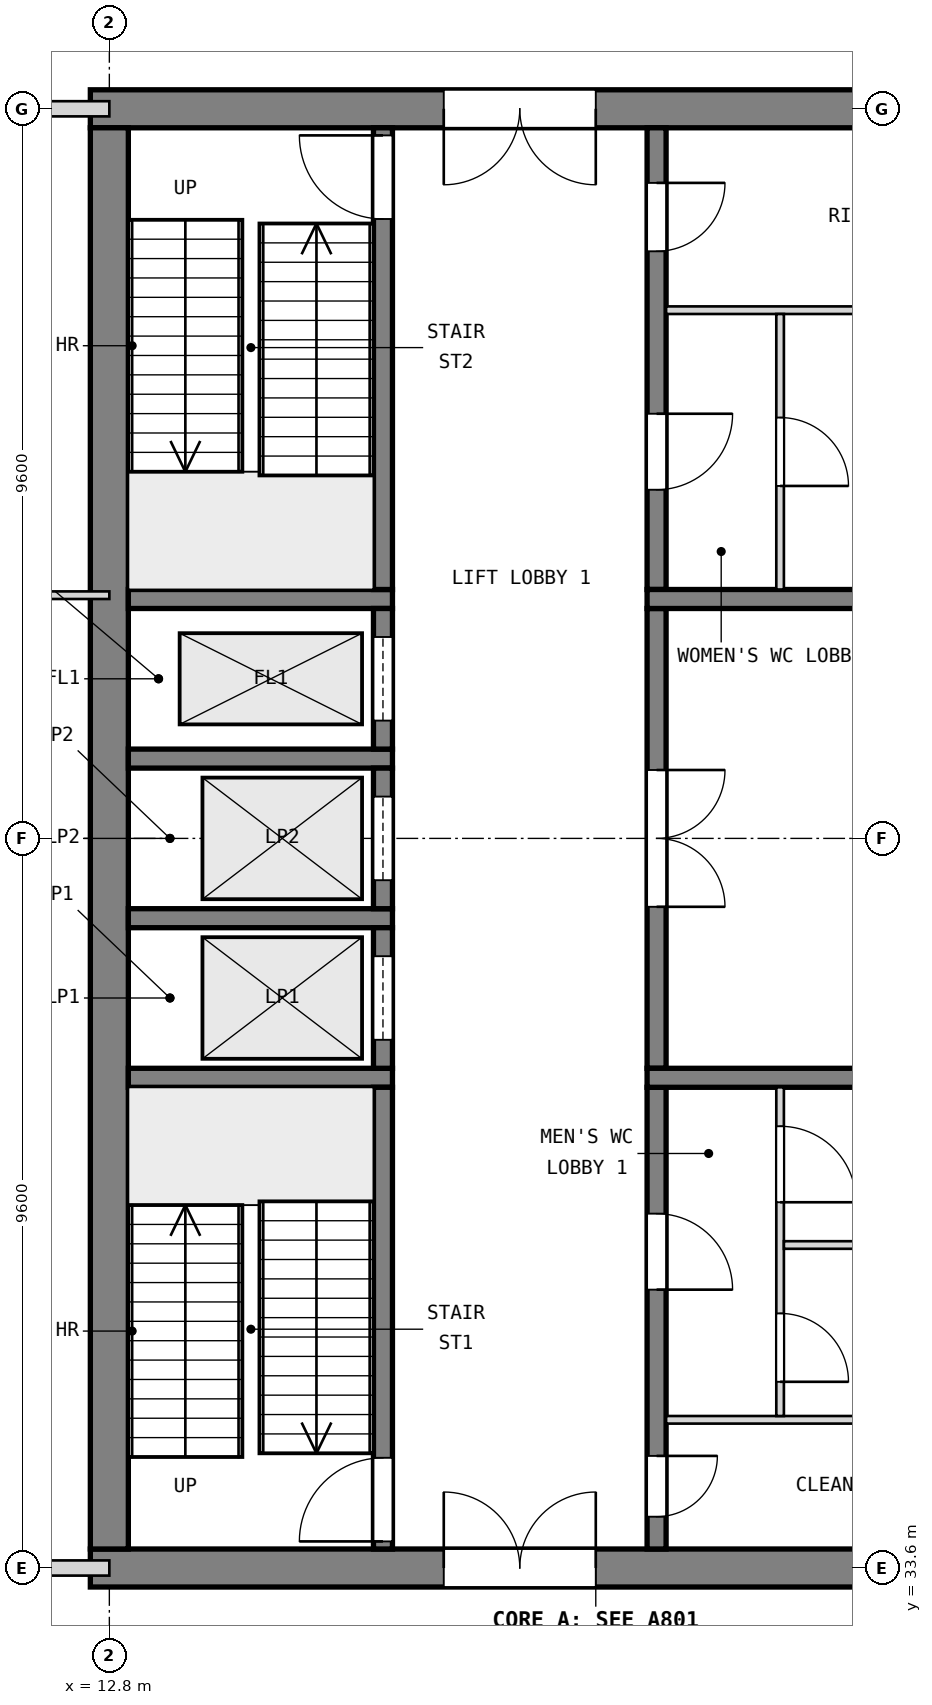
"""IFC4 building model, lengths in metres.
Left out: names, types, materials, properties, quantities, classifications, styles, units other than length and angle.
Written with IfcOpenShell. Run it as: python <this file> out.ifc"""

import sys

from ifc_helpers import new_model, si_unit, direction, frame, frame_2d, origin, place, context, subcontext, project, spatial, rectangle, extrude, element, fill, save


model = new_model("IFC4")
c1 = context("Model", 3, precision=1e-05, world=origin(), true_north=direction((0.0, 1.0)))
c2 = subcontext(c1, "Body", "Model", "MODEL_VIEW")
j1 = project(units=[si_unit("LENGTHUNIT", "METRE"), si_unit("PLANEANGLEUNIT", "RADIAN")], contexts=[c1])
p1 = place(None, origin())
s1 = spatial("IfcSite", under=j1, at=p1, CompositionType="ELEMENT")
p2 = place(p1, origin())
s2 = spatial("IfcBuilding", under=s1, at=p2, CompositionType="ELEMENT")
p3 = place(p2, frame((0.0, 0.0, -4.8)))
s3 = spatial("IfcBuildingStorey", under=s2, at=p3, CompositionType="ELEMENT", Elevation=-4.8)
p4 = place(p3, frame((12.55, 52.8, 0.0), z_axis=(0.0, 0.0, 1.0), x_axis=(1.0, 0.0, 0.0)))
e1 = element("IfcWall", 1, at=p4, inside=s3, PredefinedType="SHEAR", context=c2, shape_type="SweptSolid", body=[
    extrude(rectangle(XDim=13.3, YDim=0.5, at=frame_2d((6.65, 0.0))), origin(), (0.0, 0.0, 1.0), 4.8),
])
p5 = place(p4, frame((4.65, 0.0, 0.0)))
e2 = element("IfcOpeningElement", 2, at=p5, cuts=e1, PredefinedType="OPENING", context=c2, shape_type="SweptSolid", body=[
    extrude(rectangle(XDim=2.0, YDim=2.1, at=frame_2d((1.0, 1.05))), frame((0.0, 0.26, 0.0), z_axis=(0.0, -1.0, 0.0), x_axis=(1.0, 0.0, 0.0)), (0.0, 0.0, 1.0), 0.52),
])
p6 = place(p3, frame((12.55, 33.6, 0.0), z_axis=(0.0, 0.0, 1.0), x_axis=(1.0, 0.0, 0.0)))
e3 = element("IfcWall", 3, at=p6, inside=s3, PredefinedType="SHEAR", context=c2, shape_type="SweptSolid", body=[
    extrude(rectangle(XDim=13.3, YDim=0.5, at=frame_2d((6.65, 0.0))), origin(), (0.0, 0.0, 1.0), 4.8),
])
p7 = place(p6, frame((4.65, 0.0, 0.0)))
e4 = element("IfcOpeningElement", 4, at=p7, cuts=e3, PredefinedType="OPENING", context=c2, shape_type="SweptSolid", body=[
    extrude(rectangle(XDim=2.0, YDim=2.1, at=frame_2d((1.0, 1.05))), frame((0.0, 0.26, 0.0), z_axis=(0.0, -1.0, 0.0), x_axis=(1.0, 0.0, 0.0)), (0.0, 0.0, 1.0), 0.52),
])
p8 = place(p3, frame((12.8, 33.85, 0.0), z_axis=(0.0, 0.0, 1.0), x_axis=(0.0, 1.0, 0.0)))
e5 = element("IfcWall", 5, at=p8, inside=s3, PredefinedType="SHEAR", context=c2, shape_type="SweptSolid", body=[
    extrude(rectangle(XDim=18.7, YDim=0.5, at=frame_2d((9.35, 0.0))), origin(), (0.0, 0.0, 1.0), 4.8),
])
for number, where, z_axis, x_axis in (
    (6, (13.05, 40.05, 0.0), (0.0, 0.0, 1.0), (1.0, 0.0, 0.0)),
    (7, (13.05, 42.15, 0.0), (0.0, 0.0, 1.0), (1.0, 0.0, 0.0)),
    (8, (13.05, 44.25, 0.0), (0.0, 0.0, 1.0), (1.0, 0.0, 0.0)),
    (9, (13.05, 46.35, 0.0), (0.0, 0.0, 1.0), (1.0, 0.0, 0.0)),
):
    element("IfcWall", number, at=place(p3, frame(where, z_axis=z_axis, x_axis=x_axis)), inside=s3, PredefinedType="SOLIDWALL", context=c2, shape_type="SweptSolid", body=[
        extrude(rectangle(XDim=3.475, YDim=0.25, at=frame_2d((1.737, 0.0))), origin(), (0.0, 0.0, 1.0), 4.5),
    ])
p9 = place(p3, frame((16.4, 33.85, 0.0), z_axis=(0.0, 0.0, 1.0), x_axis=(0.0, 1.0, 0.0)))
e10 = element("IfcWall", 10, at=p9, inside=s3, PredefinedType="SOLIDWALL", context=c2, shape_type="SweptSolid", body=[
    extrude(rectangle(XDim=6.075, YDim=0.25, at=frame_2d((3.038, 0.0))), origin(), (0.0, 0.0, 1.0), 4.5),
])
p10 = place(p9, frame((0.1, 0.0, 0.0)))
e11 = element("IfcOpeningElement", 11, at=p10, cuts=e10, PredefinedType="OPENING", context=c2, shape_type="SweptSolid", body=[
    extrude(rectangle(XDim=1.1, YDim=2.1, at=frame_2d((0.55, 1.05))), frame((0.0, 0.135, 0.0), z_axis=(0.0, -1.0, 0.0), x_axis=(1.0, 0.0, 0.0)), (0.0, 0.0, 1.0), 0.27),
])
p11 = place(p3, frame((16.4, 40.175, 0.0), z_axis=(0.0, 0.0, 1.0), x_axis=(0.0, 1.0, 0.0)))
e12 = element("IfcWall", 12, at=p11, inside=s3, PredefinedType="SOLIDWALL", context=c2, shape_type="SweptSolid", body=[
    extrude(rectangle(XDim=1.85, YDim=0.25, at=frame_2d((0.925, 0.0))), origin(), (0.0, 0.0, 1.0), 4.5),
])
p12 = place(p11, frame((0.375, 0.0, 0.0)))
e13 = element("IfcOpeningElement", 13, at=p12, cuts=e12, PredefinedType="OPENING", context=c2, shape_type="SweptSolid", body=[
    extrude(rectangle(XDim=1.1, YDim=2.1, at=frame_2d((0.55, 1.05))), frame((0.0, 0.135, 0.0), z_axis=(0.0, -1.0, 0.0), x_axis=(1.0, 0.0, 0.0)), (0.0, 0.0, 1.0), 0.27),
])
p13 = place(p3, frame((16.4, 42.275, 0.0), z_axis=(0.0, 0.0, 1.0), x_axis=(0.0, 1.0, 0.0)))
e14 = element("IfcWall", 14, at=p13, inside=s3, PredefinedType="SOLIDWALL", context=c2, shape_type="SweptSolid", body=[
    extrude(rectangle(XDim=1.85, YDim=0.25, at=frame_2d((0.925, 0.0))), origin(), (0.0, 0.0, 1.0), 4.5),
])
p14 = place(p13, frame((0.375, 0.0, 0.0)))
e15 = element("IfcOpeningElement", 15, at=p14, cuts=e14, PredefinedType="OPENING", context=c2, shape_type="SweptSolid", body=[
    extrude(rectangle(XDim=1.1, YDim=2.1, at=frame_2d((0.55, 1.05))), frame((0.0, 0.135, 0.0), z_axis=(0.0, -1.0, 0.0), x_axis=(1.0, 0.0, 0.0)), (0.0, 0.0, 1.0), 0.27),
])
p15 = place(p3, frame((16.4, 44.375, 0.0), z_axis=(0.0, 0.0, 1.0), x_axis=(0.0, 1.0, 0.0)))
e16 = element("IfcWall", 16, at=p15, inside=s3, PredefinedType="SOLIDWALL", context=c2, shape_type="SweptSolid", body=[
    extrude(rectangle(XDim=1.85, YDim=0.25, at=frame_2d((0.925, 0.0))), origin(), (0.0, 0.0, 1.0), 4.5),
])
p16 = place(p15, frame((0.375, 0.0, 0.0)))
e17 = element("IfcOpeningElement", 17, at=p16, cuts=e16, PredefinedType="OPENING", context=c2, shape_type="SweptSolid", body=[
    extrude(rectangle(XDim=1.1, YDim=2.1, at=frame_2d((0.55, 1.05))), frame((0.0, 0.135, 0.0), z_axis=(0.0, -1.0, 0.0), x_axis=(1.0, 0.0, 0.0)), (0.0, 0.0, 1.0), 0.27),
])
p17 = place(p3, frame((16.4, 46.475, 0.0), z_axis=(0.0, 0.0, 1.0), x_axis=(0.0, 1.0, 0.0)))
e18 = element("IfcWall", 18, at=p17, inside=s3, PredefinedType="SOLIDWALL", context=c2, shape_type="SweptSolid", body=[
    extrude(rectangle(XDim=6.075, YDim=0.25, at=frame_2d((3.038, 0.0))), origin(), (0.0, 0.0, 1.0), 4.5),
])
p18 = place(p17, frame((4.875, 0.0, 0.0)))
e19 = element("IfcOpeningElement", 19, at=p18, cuts=e18, PredefinedType="OPENING", context=c2, shape_type="SweptSolid", body=[
    extrude(rectangle(XDim=1.1, YDim=2.1, at=frame_2d((0.55, 1.05))), frame((0.0, 0.135, 0.0), z_axis=(0.0, -1.0, 0.0), x_axis=(1.0, 0.0, 0.0)), (0.0, 0.0, 1.0), 0.27),
])
p19 = place(p3, frame((20.0, 33.85, 0.0), z_axis=(0.0, 0.0, 1.0), x_axis=(0.0, 1.0, 0.0)))
e20 = element("IfcWall", 20, at=p19, inside=s3, PredefinedType="SOLIDWALL", context=c2, shape_type="SweptSolid", body=[
    extrude(rectangle(XDim=6.075, YDim=0.25, at=frame_2d((3.038, 0.0))), origin(), (0.0, 0.0, 1.0), 4.5),
])
p20 = place(p19, frame((0.425, 0.0, 0.0)))
e21 = element("IfcOpeningElement", 21, at=p20, cuts=e20, PredefinedType="OPENING", context=c2, shape_type="SweptSolid", body=[
    extrude(rectangle(XDim=0.8, YDim=2.1, at=frame_2d((0.4, 1.05))), frame((0.0, 0.135, 0.0), z_axis=(0.0, -1.0, 0.0), x_axis=(1.0, 0.0, 0.0)), (0.0, 0.0, 1.0), 0.27),
])
p21 = place(p19, frame((3.413, 0.0, 0.0)))
e22 = element("IfcOpeningElement", 22, at=p21, cuts=e20, PredefinedType="OPENING", context=c2, shape_type="SweptSolid", body=[
    extrude(rectangle(XDim=1.0, YDim=2.1, at=frame_2d((0.5, 1.05))), frame((0.0, 0.135, 0.0), z_axis=(0.0, -1.0, 0.0), x_axis=(1.0, 0.0, 0.0)), (0.0, 0.0, 1.0), 0.27),
])
p22 = place(p3, frame((20.0, 40.175, 0.0), z_axis=(0.0, 0.0, 1.0), x_axis=(0.0, 1.0, 0.0)))
e23 = element("IfcWall", 23, at=p22, inside=s3, PredefinedType="SOLIDWALL", context=c2, shape_type="SweptSolid", body=[
    extrude(rectangle(XDim=6.05, YDim=0.25, at=frame_2d((3.025, 0.0))), origin(), (0.0, 0.0, 1.0), 4.5),
])
p23 = place(p22, frame((2.125, 0.0, 0.0)))
e24 = element("IfcOpeningElement", 24, at=p23, cuts=e23, PredefinedType="OPENING", context=c2, shape_type="SweptSolid", body=[
    extrude(rectangle(XDim=1.8, YDim=2.1, at=frame_2d((0.9, 1.05))), frame((0.0, 0.135, 0.0), z_axis=(0.0, -1.0, 0.0), x_axis=(1.0, 0.0, 0.0)), (0.0, 0.0, 1.0), 0.27),
])
p24 = place(p3, frame((20.0, 46.475, 0.0), z_axis=(0.0, 0.0, 1.0), x_axis=(0.0, 1.0, 0.0)))
e25 = element("IfcWall", 25, at=p24, inside=s3, PredefinedType="SOLIDWALL", context=c2, shape_type="SweptSolid", body=[
    extrude(rectangle(XDim=6.075, YDim=0.25, at=frame_2d((3.038, 0.0))), origin(), (0.0, 0.0, 1.0), 4.5),
])
p25 = place(p24, frame((1.312, 0.0, 0.0)))
e26 = element("IfcOpeningElement", 26, at=p25, cuts=e25, PredefinedType="OPENING", context=c2, shape_type="SweptSolid", body=[
    extrude(rectangle(XDim=1.0, YDim=2.1, at=frame_2d((0.5, 1.05))), frame((0.0, 0.135, 0.0), z_axis=(0.0, -1.0, 0.0), x_axis=(1.0, 0.0, 0.0)), (0.0, 0.0, 1.0), 0.27),
])
p26 = place(p24, frame((4.45, 0.0, 0.0)))
e27 = element("IfcOpeningElement", 27, at=p26, cuts=e25, PredefinedType="OPENING", context=c2, shape_type="SweptSolid", body=[
    extrude(rectangle(XDim=0.9, YDim=2.1, at=frame_2d((0.45, 1.05))), frame((0.0, 0.135, 0.0), z_axis=(0.0, -1.0, 0.0), x_axis=(1.0, 0.0, 0.0)), (0.0, 0.0, 1.0), 0.27),
])
for number, where, z_axis, x_axis in (
    (28, (19.875, 40.05, 0.0), (0.0, 0.0, 1.0), (1.0, 0.0, 0.0)),
    (29, (19.875, 46.35, 0.0), (0.0, 0.0, 1.0), (1.0, 0.0, 0.0)),
):
    element("IfcWall", number, at=place(p3, frame(where, z_axis=z_axis, x_axis=x_axis)), inside=s3, PredefinedType="SOLIDWALL", context=c2, shape_type="SweptSolid", body=[
        extrude(rectangle(XDim=5.475, YDim=0.25, at=frame_2d((2.738, 0.0))), origin(), (0.0, 0.0, 1.0), 4.5),
    ])
p27 = place(p3, frame((20.125, 35.55, 0.0), z_axis=(0.0, 0.0, 1.0), x_axis=(1.0, 0.0, 0.0)))
e30 = element("IfcWall", 30, at=p27, inside=s3, PredefinedType="PARTITIONING", context=c2, shape_type="SweptSolid", body=[
    extrude(rectangle(XDim=5.225, YDim=0.1, at=frame_2d((2.613, 0.0))), origin(), (0.0, 0.0, 1.0), 4.5),
])
p28 = place(p3, frame((21.625, 35.6, 0.0), z_axis=(0.0, 0.0, 1.0), x_axis=(0.0, 1.0, 0.0)))
e31 = element("IfcWall", 31, at=p28, inside=s3, PredefinedType="PARTITIONING", context=c2, shape_type="SweptSolid", body=[
    extrude(rectangle(XDim=4.325, YDim=0.1, at=frame_2d((2.163, 0.0))), origin(), (0.0, 0.0, 1.0), 4.5),
])
p29 = place(p28, frame((0.45, 0.0, 0.0)))
e32 = element("IfcOpeningElement", 32, at=p29, cuts=e31, PredefinedType="OPENING", context=c2, shape_type="SweptSolid", body=[
    extrude(rectangle(XDim=0.9, YDim=2.1, at=frame_2d((0.45, 1.05))), frame((0.0, 0.06, 0.0), z_axis=(0.0, -1.0, 0.0), x_axis=(1.0, 0.0, 0.0)), (0.0, 0.0, 1.0), 0.12),
])
p30 = place(p28, frame((2.812, 0.0, 0.0)))
e33 = element("IfcOpeningElement", 33, at=p30, cuts=e31, PredefinedType="OPENING", context=c2, shape_type="SweptSolid", body=[
    extrude(rectangle(XDim=1.0, YDim=2.1, at=frame_2d((0.5, 1.05))), frame((0.0, 0.06, 0.0), z_axis=(0.0, -1.0, 0.0), x_axis=(1.0, 0.0, 0.0)), (0.0, 0.0, 1.0), 0.12),
])
p31 = place(p3, frame((21.675, 37.85, 0.0), z_axis=(0.0, 0.0, 1.0), x_axis=(1.0, 0.0, 0.0)))
e34 = element("IfcWall", 34, at=p31, inside=s3, PredefinedType="PARTITIONING", context=c2, shape_type="SweptSolid", body=[
    extrude(rectangle(XDim=3.675, YDim=0.1, at=frame_2d((1.837, 0.0))), origin(), (0.0, 0.0, 1.0), 4.5),
])
p32 = place(p3, frame((20.125, 50.15, 0.0), z_axis=(0.0, 0.0, 1.0), x_axis=(1.0, 0.0, 0.0)))
e35 = element("IfcWall", 35, at=p32, inside=s3, PredefinedType="PARTITIONING", context=c2, shape_type="SweptSolid", body=[
    extrude(rectangle(XDim=5.225, YDim=0.1, at=frame_2d((2.613, 0.0))), origin(), (0.0, 0.0, 1.0), 4.5),
])
p33 = place(p3, frame((21.625, 46.475, 0.0), z_axis=(0.0, 0.0, 1.0), x_axis=(0.0, 1.0, 0.0)))
e36 = element("IfcWall", 36, at=p33, inside=s3, PredefinedType="PARTITIONING", context=c2, shape_type="SweptSolid", body=[
    extrude(rectangle(XDim=3.625, YDim=0.1, at=frame_2d((1.812, 0.0))), origin(), (0.0, 0.0, 1.0), 4.5),
])
p34 = place(p33, frame((1.363, 0.0, 0.0)))
e37 = element("IfcOpeningElement", 37, at=p34, cuts=e36, PredefinedType="OPENING", context=c2, shape_type="SweptSolid", body=[
    extrude(rectangle(XDim=0.9, YDim=2.1, at=frame_2d((0.45, 1.05))), frame((0.0, 0.06, 0.0), z_axis=(0.0, -1.0, 0.0), x_axis=(1.0, 0.0, 0.0)), (0.0, 0.0, 1.0), 0.12),
])
p35 = place(p3, frame((0.15, 33.6, 0.0), z_axis=(0.0, 0.0, 1.0), x_axis=(1.0, 0.0, 0.0)))
e38 = element("IfcWall", 38, at=p35, inside=s3, PredefinedType="PARTITIONING", context=c2, shape_type="SweptSolid", body=[
    extrude(rectangle(XDim=12.65, YDim=0.2, at=frame_2d((6.325, 0.0))), origin(), (0.0, 0.0, 1.0), 4.5),
])
p36 = place(p35, frame((5.35, 0.0, 0.0)))
e39 = element("IfcOpeningElement", 39, at=p36, cuts=e38, PredefinedType="OPENING", context=c2, shape_type="SweptSolid", body=[
    extrude(rectangle(XDim=1.8, YDim=2.1, at=frame_2d((0.9, 1.05))), frame((0.0, 0.11, 0.0), z_axis=(0.0, -1.0, 0.0), x_axis=(1.0, 0.0, 0.0)), (0.0, 0.0, 1.0), 0.22),
])
p37 = place(p3, frame((4.55, 46.4, 0.0), z_axis=(0.0, 0.0, 1.0), x_axis=(1.0, 0.0, 0.0)))
e40 = element("IfcWall", 40, at=p37, inside=s3, PredefinedType="PARTITIONING", context=c2, shape_type="SweptSolid", body=[
    extrude(rectangle(XDim=8.25, YDim=0.1, at=frame_2d((4.125, 0.0))), origin(), (0.0, 0.0, 1.0), 4.5),
])
p38 = place(p3, frame((4.725, 52.8, 0.0), z_axis=(0.0, 0.0, 1.0), x_axis=(1.0, 0.0, 0.0)))
e41 = element("IfcWall", 41, at=p38, inside=s3, PredefinedType="PARTITIONING", context=c2, shape_type="SweptSolid", body=[
    extrude(rectangle(XDim=8.075, YDim=0.2, at=frame_2d((4.038, 0.0))), origin(), (0.0, 0.0, 1.0), 4.5),
])
p39 = place(p38, frame((3.425, 0.0, 0.0)))
e42 = element("IfcOpeningElement", 42, at=p39, cuts=e41, PredefinedType="OPENING", context=c2, shape_type="SweptSolid", body=[
    extrude(rectangle(XDim=1.1, YDim=2.1, at=frame_2d((0.55, 1.05))), frame((0.0, 0.11, 0.0), z_axis=(0.0, -1.0, 0.0), x_axis=(1.0, 0.0, 0.0)), (0.0, 0.0, 1.0), 0.22),
])
p40 = place(p10, origin())
e43 = element("IfcDoor", 43, at=p40, inside=s3, OperationType="SINGLE_SWING_LEFT", PredefinedType="DOOR", context=c2, shape_type="SweptSolid", body=[
    extrude(rectangle(XDim=1.1, YDim=2.1, at=frame_2d((0.55, 1.05))), frame((0.0, 0.025, 0.0), z_axis=(0.0, -1.0, 0.0), x_axis=(1.0, 0.0, 0.0)), (0.0, 0.0, 1.0), 0.05),
])
fill(e11, e43)
p41 = place(p18, origin())
e44 = element("IfcDoor", 44, at=p41, inside=s3, OperationType="SINGLE_SWING_RIGHT", PredefinedType="DOOR", context=c2, shape_type="SweptSolid", body=[
    extrude(rectangle(XDim=1.1, YDim=2.1, at=frame_2d((0.55, 1.05))), frame((0.0, 0.025, 0.0), z_axis=(0.0, -1.0, 0.0), x_axis=(1.0, 0.0, 0.0)), (0.0, 0.0, 1.0), 0.05),
])
fill(e19, e44)
p42 = place(p12, origin())
e45 = element("IfcDoor", 45, at=p42, inside=s3, OperationType="SLIDING_TO_LEFT", PredefinedType="DOOR", context=c2, shape_type="SweptSolid", body=[
    extrude(rectangle(XDim=1.1, YDim=2.1, at=frame_2d((0.55, 1.05))), frame((0.0, 0.025, 0.0), z_axis=(0.0, -1.0, 0.0), x_axis=(1.0, 0.0, 0.0)), (0.0, 0.0, 1.0), 0.05),
])
fill(e13, e45)
p43 = place(p14, origin())
e46 = element("IfcDoor", 46, at=p43, inside=s3, OperationType="SLIDING_TO_LEFT", PredefinedType="DOOR", context=c2, shape_type="SweptSolid", body=[
    extrude(rectangle(XDim=1.1, YDim=2.1, at=frame_2d((0.55, 1.05))), frame((0.0, 0.025, 0.0), z_axis=(0.0, -1.0, 0.0), x_axis=(1.0, 0.0, 0.0)), (0.0, 0.0, 1.0), 0.05),
])
fill(e15, e46)
p44 = place(p16, origin())
e47 = element("IfcDoor", 47, at=p44, inside=s3, OperationType="SLIDING_TO_LEFT", PredefinedType="DOOR", context=c2, shape_type="SweptSolid", body=[
    extrude(rectangle(XDim=1.1, YDim=2.1, at=frame_2d((0.55, 1.05))), frame((0.0, 0.025, 0.0), z_axis=(0.0, -1.0, 0.0), x_axis=(1.0, 0.0, 0.0)), (0.0, 0.0, 1.0), 0.05),
])
fill(e17, e47)
p45 = place(p23, frame((1.8, 0.0, 0.0), z_axis=(0.0, 0.0, 1.0), x_axis=(-1.0, 0.0, 0.0)))
e48 = element("IfcDoor", 48, at=p45, inside=s3, OperationType="DOUBLE_DOOR_SINGLE_SWING", PredefinedType="DOOR", context=c2, shape_type="SweptSolid", body=[
    extrude(rectangle(XDim=1.8, YDim=2.1, at=frame_2d((0.9, 1.05))), frame((0.0, 0.025, 0.0), z_axis=(0.0, -1.0, 0.0), x_axis=(1.0, 0.0, 0.0)), (0.0, 0.0, 1.0), 0.05),
])
fill(e24, e48)
p46 = place(p20, frame((0.8, 0.0, 0.0), z_axis=(0.0, 0.0, 1.0), x_axis=(-1.0, 0.0, 0.0)))
e49 = element("IfcDoor", 49, at=p46, inside=s3, OperationType="SINGLE_SWING_LEFT", PredefinedType="DOOR", context=c2, shape_type="SweptSolid", body=[
    extrude(rectangle(XDim=0.8, YDim=2.1, at=frame_2d((0.4, 1.05))), frame((0.0, 0.025, 0.0), z_axis=(0.0, -1.0, 0.0), x_axis=(1.0, 0.0, 0.0)), (0.0, 0.0, 1.0), 0.05),
])
fill(e21, e49)
p47 = place(p21, frame((1.0, 0.0, 0.0), z_axis=(0.0, 0.0, 1.0), x_axis=(-1.0, 0.0, 0.0)))
e50 = element("IfcDoor", 50, at=p47, inside=s3, OperationType="SINGLE_SWING_RIGHT", PredefinedType="DOOR", context=c2, shape_type="SweptSolid", body=[
    extrude(rectangle(XDim=1.0, YDim=2.1, at=frame_2d((0.5, 1.05))), frame((0.0, 0.025, 0.0), z_axis=(0.0, -1.0, 0.0), x_axis=(1.0, 0.0, 0.0)), (0.0, 0.0, 1.0), 0.05),
])
fill(e22, e50)
p48 = place(p29, frame((0.9, 0.0, 0.0), z_axis=(0.0, 0.0, 1.0), x_axis=(-1.0, 0.0, 0.0)))
e51 = element("IfcDoor", 51, at=p48, inside=s3, OperationType="SINGLE_SWING_RIGHT", PredefinedType="DOOR", context=c2, shape_type="SweptSolid", body=[
    extrude(rectangle(XDim=0.9, YDim=2.1, at=frame_2d((0.45, 1.05))), frame((0.0, 0.025, 0.0), z_axis=(0.0, -1.0, 0.0), x_axis=(1.0, 0.0, 0.0)), (0.0, 0.0, 1.0), 0.05),
])
fill(e32, e51)
p49 = place(p30, frame((1.0, 0.0, 0.0), z_axis=(0.0, 0.0, 1.0), x_axis=(-1.0, 0.0, 0.0)))
e52 = element("IfcDoor", 52, at=p49, inside=s3, OperationType="SINGLE_SWING_RIGHT", PredefinedType="DOOR", context=c2, shape_type="SweptSolid", body=[
    extrude(rectangle(XDim=1.0, YDim=2.1, at=frame_2d((0.5, 1.05))), frame((0.0, 0.025, 0.0), z_axis=(0.0, -1.0, 0.0), x_axis=(1.0, 0.0, 0.0)), (0.0, 0.0, 1.0), 0.05),
])
fill(e33, e52)
p50 = place(p25, frame((1.0, 0.0, 0.0), z_axis=(0.0, 0.0, 1.0), x_axis=(-1.0, 0.0, 0.0)))
e53 = element("IfcDoor", 53, at=p50, inside=s3, OperationType="SINGLE_SWING_LEFT", PredefinedType="DOOR", context=c2, shape_type="SweptSolid", body=[
    extrude(rectangle(XDim=1.0, YDim=2.1, at=frame_2d((0.5, 1.05))), frame((0.0, 0.025, 0.0), z_axis=(0.0, -1.0, 0.0), x_axis=(1.0, 0.0, 0.0)), (0.0, 0.0, 1.0), 0.05),
])
fill(e26, e53)
p51 = place(p34, frame((0.9, 0.0, 0.0), z_axis=(0.0, 0.0, 1.0), x_axis=(-1.0, 0.0, 0.0)))
e54 = element("IfcDoor", 54, at=p51, inside=s3, OperationType="SINGLE_SWING_RIGHT", PredefinedType="DOOR", context=c2, shape_type="SweptSolid", body=[
    extrude(rectangle(XDim=0.9, YDim=2.1, at=frame_2d((0.45, 1.05))), frame((0.0, 0.025, 0.0), z_axis=(0.0, -1.0, 0.0), x_axis=(1.0, 0.0, 0.0)), (0.0, 0.0, 1.0), 0.05),
])
fill(e37, e54)
p52 = place(p26, frame((0.9, 0.0, 0.0), z_axis=(0.0, 0.0, 1.0), x_axis=(-1.0, 0.0, 0.0)))
e55 = element("IfcDoor", 55, at=p52, inside=s3, OperationType="SINGLE_SWING_LEFT", PredefinedType="DOOR", context=c2, shape_type="SweptSolid", body=[
    extrude(rectangle(XDim=0.9, YDim=2.1, at=frame_2d((0.45, 1.05))), frame((0.0, 0.025, 0.0), z_axis=(0.0, -1.0, 0.0), x_axis=(1.0, 0.0, 0.0)), (0.0, 0.0, 1.0), 0.05),
])
fill(e27, e55)
p53 = place(p7, origin())
e56 = element("IfcDoor", 56, at=p53, inside=s3, OperationType="DOUBLE_DOOR_SINGLE_SWING", PredefinedType="DOOR", context=c2, shape_type="SweptSolid", body=[
    extrude(rectangle(XDim=2.0, YDim=2.1, at=frame_2d((1.0, 1.05))), frame((0.0, 0.025, 0.0), z_axis=(0.0, -1.0, 0.0), x_axis=(1.0, 0.0, 0.0)), (0.0, 0.0, 1.0), 0.05),
])
fill(e4, e56)
p54 = place(p5, frame((2.0, 0.0, 0.0), z_axis=(0.0, 0.0, 1.0), x_axis=(-1.0, 0.0, 0.0)))
e57 = element("IfcDoor", 57, at=p54, inside=s3, OperationType="DOUBLE_DOOR_SINGLE_SWING", PredefinedType="DOOR", context=c2, shape_type="SweptSolid", body=[
    extrude(rectangle(XDim=2.0, YDim=2.1, at=frame_2d((1.0, 1.05))), frame((0.0, 0.025, 0.0), z_axis=(0.0, -1.0, 0.0), x_axis=(1.0, 0.0, 0.0)), (0.0, 0.0, 1.0), 0.05),
])
fill(e2, e57)
save(model, sys.argv[1])
